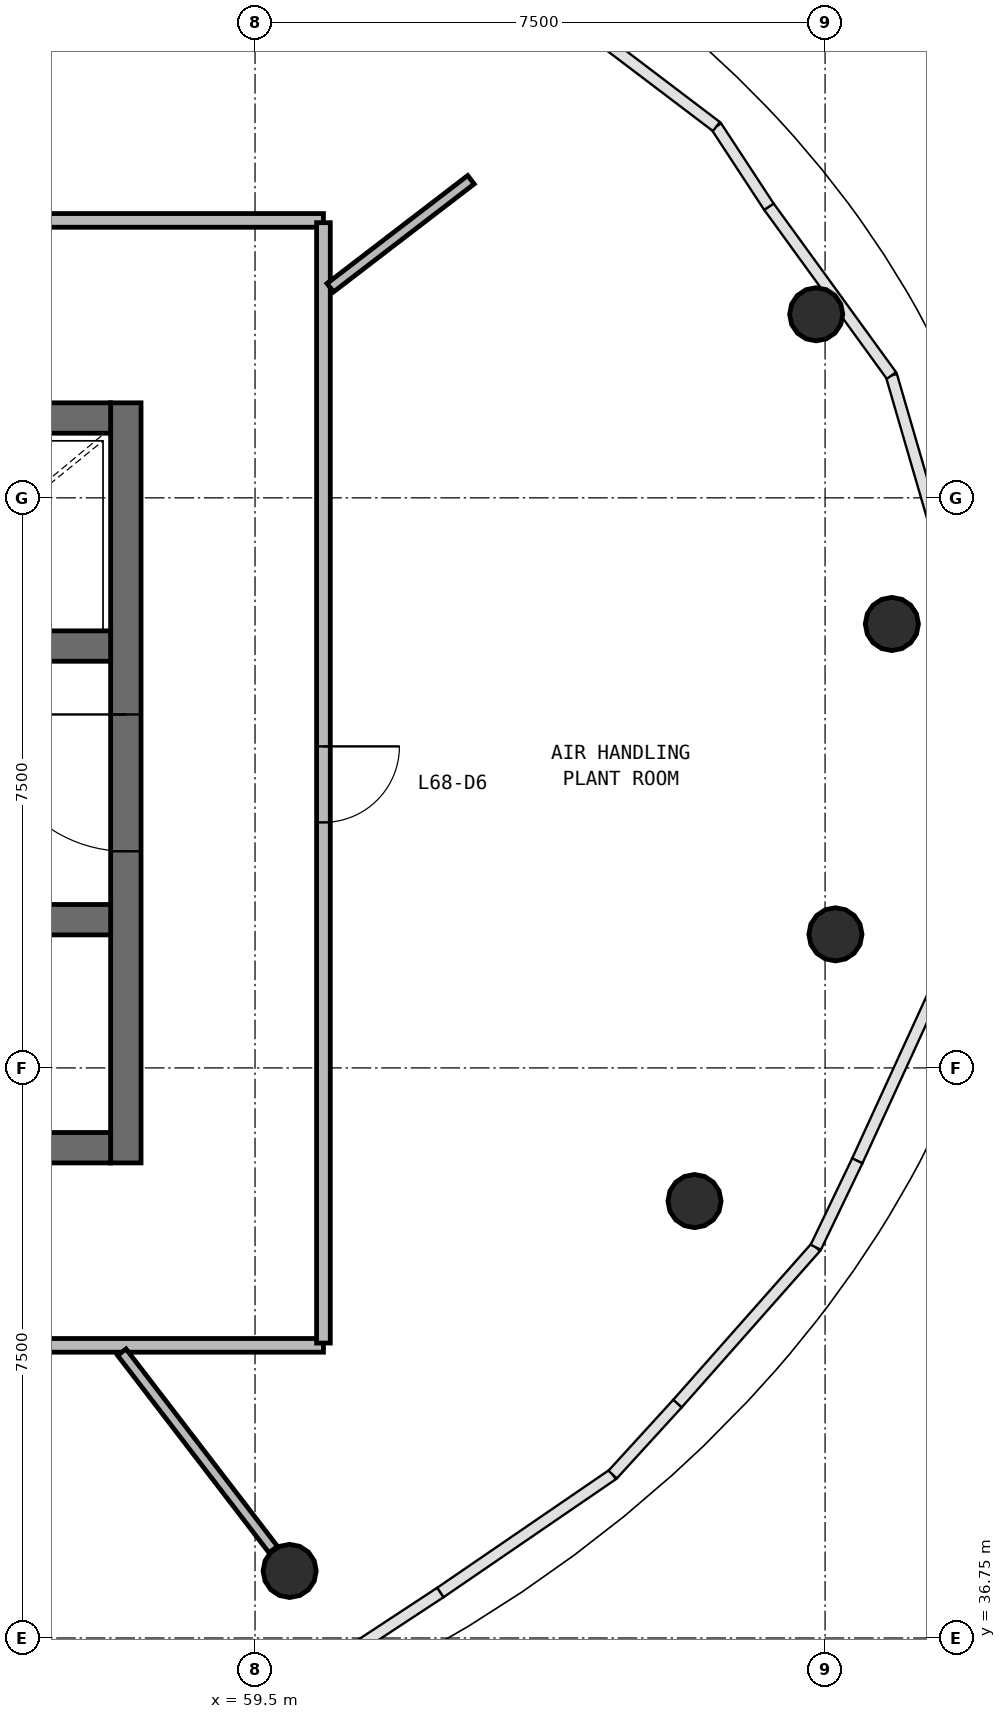
"""IFC4 building model, lengths in metres.
Left out: names, types, materials, properties, quantities, classifications, styles, units other than length and angle.
Written with IfcOpenShell. Run it as: python <this file> out.ifc"""

import sys

from ifc_helpers import new_model, si_unit, direction, frame, frame_2d, origin, origin_2d, place, context, subcontext, project, spatial, rectangle, circle, extrude, source, transform, mapped, element, fill, save


model = new_model("IFC4")
c1 = context("Model", 3, precision=1e-05, world=origin(), true_north=direction((0.0, 1.0)))
c2 = subcontext(c1, "Body", "Model", "MODEL_VIEW")
j1 = project(units=[si_unit("LENGTHUNIT", "METRE"), si_unit("PLANEANGLEUNIT", "RADIAN")], contexts=[c1])
p1 = place(None, origin())
s1 = spatial("IfcSite", under=j1, at=p1, CompositionType="ELEMENT")
p2 = place(p1, origin())
s2 = spatial("IfcBuilding", under=s1, at=p2, CompositionType="ELEMENT")
p3 = place(p2, frame((0.0, 0.0, 276.6)))
s3 = spatial("IfcBuildingStorey", under=s2, at=p3, CompositionType="ELEMENT", Elevation=276.6)
p4 = place(p3, frame((57.8, 43.0, 0.0), z_axis=(0.0, 0.0, 1.0), x_axis=(0.0, 1.0, 0.0)))
e1 = element("IfcWall", 1, at=p4, inside=s3, PredefinedType="SHEAR", context=c2, shape_type="SweptSolid", body=[
    extrude(rectangle(XDim=10.0, YDim=0.4, at=frame_2d((5.0, 0.0))), origin(), (0.0, 0.0, 1.0), 3.5),
])
p5 = place(p4, frame((4.1, 0.0, 0.0)))
e2 = element("IfcOpeningElement", 2, at=p5, cuts=e1, PredefinedType="OPENING", context=c2, shape_type="SweptSolid", body=[
    extrude(rectangle(XDim=1.8, YDim=2.1, at=frame_2d((0.9, 1.05))), frame((0.0, 0.21, 0.0), z_axis=(0.0, -1.0, 0.0), x_axis=(1.0, 0.0, 0.0)), (0.0, 0.0, 1.0), 0.42),
])
p6 = place(p3, frame((46.4, 43.2, 0.0), z_axis=(0.0, 0.0, 1.0), x_axis=(1.0, 0.0, 0.0)))
e3 = element("IfcWall", 3, at=p6, inside=s3, PredefinedType="SHEAR", context=c2, shape_type="SweptSolid", body=[
    extrude(rectangle(XDim=11.2, YDim=0.4, at=frame_2d((5.6, 0.0))), origin(), (0.0, 0.0, 1.0), 3.5),
])
p7 = place(p3, frame((57.6, 52.8, 0.0), z_axis=(0.0, 0.0, 1.0), x_axis=(-1.0, 0.0, 0.0)))
e4 = element("IfcWall", 4, at=p7, inside=s3, PredefinedType="SHEAR", context=c2, shape_type="SweptSolid", body=[
    extrude(rectangle(XDim=11.2, YDim=0.4, at=frame_2d((5.6, 0.0))), origin(), (0.0, 0.0, 1.0), 3.5),
])
p8 = place(p7, frame((6.1, 0.0, 0.0)))
e5 = element("IfcOpeningElement", 5, at=p8, cuts=e4, PredefinedType="OPENING", context=c2, shape_type="SweptSolid", body=[
    extrude(rectangle(XDim=1.0, YDim=2.1, at=frame_2d((0.5, 1.05))), frame((0.0, 0.21, 0.0), z_axis=(0.0, -1.0, 0.0), x_axis=(1.0, 0.0, 0.0)), (0.0, 0.0, 1.0), 0.42),
])
p9 = place(p3, frame((46.4, 49.8, 0.0), z_axis=(0.0, 0.0, 1.0), x_axis=(1.0, 0.0, 0.0)))
e6 = element("IfcWall", 6, at=p9, inside=s3, PredefinedType="SHEAR", context=c2, shape_type="SweptSolid", body=[
    extrude(rectangle(XDim=11.2, YDim=0.4, at=frame_2d((5.6, 0.0))), origin(), (0.0, 0.0, 1.0), 3.5),
])
p10 = place(p9, frame((8.95, 0.0, 0.0)))
e7 = element("IfcOpeningElement", 7, at=p10, cuts=e6, PredefinedType="OPENING", context=c2, shape_type="SweptSolid", body=[
    extrude(rectangle(XDim=1.1, YDim=2.1, at=frame_2d((0.55, 1.05))), frame((0.0, 0.21, 0.0), z_axis=(0.0, -1.0, 0.0), x_axis=(1.0, 0.0, 0.0)), (0.0, 0.0, 1.0), 0.42),
])
p11 = place(p9, frame((5.65, 0.0, 0.0)))
e8 = element("IfcOpeningElement", 8, at=p11, cuts=e6, PredefinedType="OPENING", context=c2, shape_type="SweptSolid", body=[
    extrude(rectangle(XDim=0.9, YDim=2.1, at=frame_2d((0.45, 1.05))), frame((0.0, 0.21, 0.0), z_axis=(0.0, -1.0, 0.0), x_axis=(1.0, 0.0, 0.0)), (0.0, 0.0, 1.0), 0.42),
])
p12 = place(p3, frame((46.4, 46.2, 0.0), z_axis=(0.0, 0.0, 1.0), x_axis=(1.0, 0.0, 0.0)))
e9 = element("IfcWall", 9, at=p12, inside=s3, PredefinedType="SHEAR", context=c2, shape_type="SweptSolid", body=[
    extrude(rectangle(XDim=11.2, YDim=0.4, at=frame_2d((5.6, 0.0))), origin(), (0.0, 0.0, 1.0), 3.5),
])
p13 = place(p12, frame((5.65, 0.0, 0.0)))
e10 = element("IfcOpeningElement", 10, at=p13, cuts=e9, PredefinedType="OPENING", context=c2, shape_type="SweptSolid", body=[
    extrude(rectangle(XDim=0.9, YDim=2.1, at=frame_2d((0.45, 1.05))), frame((0.0, 0.21, 0.0), z_axis=(0.0, -1.0, 0.0), x_axis=(1.0, 0.0, 0.0)), (0.0, 0.0, 1.0), 0.42),
])
m1 = source(origin(), c2, "Body", "SweptSolid", [
    extrude(circle(Radius=0.35, at=origin_2d()), origin(), (0.0, 0.0, 1.0), 4.014),
])
p14 = place(p3, frame((67.879, 50.091, 0.174), z_axis=(-0.48560488086, -0.063916184068, 0.871838643958), x_axis=(0.13049626669, -0.991448800685, 0.0)))
e11 = element("IfcColumn", 11, at=p14, inside=s3, PredefinedType="COLUMN", context=c2, shape_type="MappedRepresentation", body=[
    mapped(m1, transform((0.0, 0.0, 0.0), scale=1.0)),
])
m2 = source(origin(), c2, "Body", "SweptSolid", [
    extrude(circle(Radius=0.35, at=origin_2d()), origin(), (0.0, 0.0, 1.0), 4.07),
])
p15 = place(p3, frame((66.883, 54.165, 0.181), z_axis=(-0.471365631204, -0.195217483001, 0.86006079788), x_axis=(0.382635660379, -0.923899318869, 0.0)))
e12 = element("IfcColumn", 12, at=p15, inside=s3, PredefinedType="COLUMN", context=c2, shape_type="MappedRepresentation", body=[
    mapped(m2, transform((0.0, 0.0, 0.0), scale=1.0)),
])
m3 = source(origin(), c2, "Body", "SweptSolid", [
    extrude(circle(Radius=0.35, at=origin_2d()), origin(), (0.0, 0.0, 1.0), 3.747),
])
p16 = place(p3, frame((56.914, 36.137, 0.128), z_axis=(-0.136577604612, 0.329715018769, 0.934149112464), x_axis=(-0.923874408562, -0.38269580244, 0.0)))
e13 = element("IfcColumn", 13, at=p16, inside=s3, PredefinedType="COLUMN", context=c2, shape_type="MappedRepresentation", body=[
    mapped(m3, transform((0.0, 0.0, 0.0), scale=1.0)),
])
m4 = source(origin(), c2, "Body", "SweptSolid", [
    extrude(circle(Radius=0.35, at=origin_2d()), origin(), (0.0, 0.0, 1.0), 3.739),
])
p17 = place(p3, frame((59.956, 37.632, 0.126), z_axis=(-0.21405361087, 0.278961874812, 0.936141722217), x_axis=(-0.793355214176, -0.608758986907, 0.0)))
e14 = element("IfcColumn", 14, at=p17, inside=s3, PredefinedType="COLUMN", context=c2, shape_type="MappedRepresentation", body=[
    mapped(m4, transform((0.0, 0.0, 0.0), scale=1.0)),
])
m5 = source(origin(), c2, "Body", "SweptSolid", [
    extrude(circle(Radius=0.35, at=origin_2d()), origin(), (0.0, 0.0, 1.0), 3.807),
])
p18 = place(p3, frame((65.282, 42.498, 0.141), z_axis=(-0.363645996148, 0.150626775693, 0.919278610613), x_axis=(-0.382682721486, -0.923879826967, 0.0)))
e15 = element("IfcColumn", 15, at=p18, inside=s3, PredefinedType="COLUMN", context=c2, shape_type="MappedRepresentation", body=[
    mapped(m5, transform((0.0, 0.0, 0.0), scale=1.0)),
])
m6 = source(origin(), c2, "Body", "SweptSolid", [
    extrude(circle(Radius=0.35, at=origin_2d()), origin(), (0.0, 0.0, 1.0), 3.898),
])
p19 = place(p3, frame((67.136, 46.007, 0.157), z_axis=(-0.436578084577, 0.057429651923, 0.897831504876), x_axis=(-0.130421400619, -0.991458651816, 0.0)))
e16 = element("IfcColumn", 16, at=p19, inside=s3, PredefinedType="COLUMN", context=c2, shape_type="MappedRepresentation", body=[
    mapped(m6, transform((0.0, 0.0, 0.0), scale=1.0)),
])
p20 = place(p3, frame((43.6, 55.4, 0.0), z_axis=(0.0, 0.0, 1.0), x_axis=(1.0, 0.0, 0.0)))
e17 = element("IfcWall", 17, at=p20, inside=s3, PredefinedType="PARTITIONING", context=c2, shape_type="SweptSolid", body=[
    extrude(rectangle(XDim=16.8, YDim=0.18, at=frame_2d((8.4, 0.0))), origin(), (0.0, 0.0, 1.0), 2.62),
])
p21 = place(p20, frame((7.95, 0.0, 0.0)))
e18 = element("IfcOpeningElement", 18, at=p21, cuts=e17, PredefinedType="OPENING", context=c2, shape_type="SweptSolid", body=[
    extrude(rectangle(XDim=1.0, YDim=2.1, at=frame_2d((0.5, 1.05))), frame((0.0, 0.1, 0.0), z_axis=(0.0, -1.0, 0.0), x_axis=(1.0, 0.0, 0.0)), (0.0, 0.0, 1.0), 0.2),
])
p22 = place(p3, frame((60.4, 40.6, 0.0), z_axis=(0.0, 0.0, 1.0), x_axis=(-1.0, 0.0, 0.0)))
e19 = element("IfcWall", 19, at=p22, inside=s3, PredefinedType="PARTITIONING", context=c2, shape_type="SweptSolid", body=[
    extrude(rectangle(XDim=16.8, YDim=0.18, at=frame_2d((8.4, 0.0))), origin(), (0.0, 0.0, 1.0), 2.62),
])
p23 = place(p22, frame((7.95, 0.0, 0.0)))
e20 = element("IfcOpeningElement", 20, at=p23, cuts=e19, PredefinedType="OPENING", context=c2, shape_type="SweptSolid", body=[
    extrude(rectangle(XDim=1.0, YDim=2.1, at=frame_2d((0.5, 1.05))), frame((0.0, 0.1, 0.0), z_axis=(0.0, -1.0, 0.0), x_axis=(1.0, 0.0, 0.0)), (0.0, 0.0, 1.0), 0.2),
])
p24 = place(p3, frame((60.4, 55.37, 0.0), z_axis=(0.0, 0.0, 1.0), x_axis=(0.0, -1.0, 0.0)))
e21 = element("IfcWall", 21, at=p24, inside=s3, PredefinedType="PARTITIONING", context=c2, shape_type="SweptSolid", body=[
    extrude(rectangle(XDim=14.74, YDim=0.18, at=frame_2d((7.37, 0.0))), origin(), (0.0, 0.0, 1.0), 2.62),
])
p25 = place(p24, frame((6.89, 0.0, 0.0)))
e22 = element("IfcOpeningElement", 22, at=p25, cuts=e21, PredefinedType="OPENING", context=c2, shape_type="SweptSolid", body=[
    extrude(rectangle(XDim=1.0, YDim=2.1, at=frame_2d((0.5, 1.05))), frame((0.0, 0.1, 0.0), z_axis=(0.0, -1.0, 0.0), x_axis=(1.0, 0.0, 0.0)), (0.0, 0.0, 1.0), 0.2),
])
p26 = place(p3, frame((60.49, 54.515, 0.0), z_axis=(0.0, 0.0, 1.0), x_axis=(0.793370454613, 0.608739124542, 0.0)))
e23 = element("IfcWall", 23, at=p26, inside=s3, PredefinedType="PARTITIONING", context=c2, shape_type="SweptSolid", body=[
    extrude(rectangle(XDim=2.333, YDim=0.14, at=frame_2d((1.166, 0.0))), origin(), (0.0, 0.0, 1.0), 2.62),
])
p27 = place(p3, frame((57.747, 40.51, 0.0), z_axis=(0.0, 0.0, 1.0), x_axis=(0.608736894437, -0.793372165728, 0.0)))
e24 = element("IfcWall", 24, at=p27, inside=s3, PredefinedType="PARTITIONING", context=c2, shape_type="SweptSolid", body=[
    extrude(rectangle(XDim=3.273, YDim=0.14, at=frame_2d((1.636, 0.0))), origin(), (0.0, 0.0, 1.0), 2.62),
])
m7 = source(origin(), c2, "Body", "SweptSolid", [
    extrude(rectangle(XDim=1.8, YDim=2.1, at=frame_2d((0.9, 1.05))), frame((0.0, 0.025, 0.0), z_axis=(0.0, -1.0, 0.0), x_axis=(1.0, 0.0, 0.0)), (0.0, 0.0, 1.0), 0.05),
])
p28 = place(p5, origin())
e25 = element("IfcDoor", 25, at=p28, inside=s3, OperationType="SINGLE_SWING_RIGHT", PredefinedType="DOOR", context=c2, shape_type="MappedRepresentation", body=[
    mapped(m7, transform((0.0, 0.0, 0.0), scale=1.0)),
])
fill(e2, e25)
m8 = source(origin(), c2, "Body", "SweptSolid", [
    extrude(rectangle(XDim=1.0, YDim=2.1, at=frame_2d((0.5, 1.05))), frame((0.0, 0.025, 0.0), z_axis=(0.0, -1.0, 0.0), x_axis=(1.0, 0.0, 0.0)), (0.0, 0.0, 1.0), 0.05),
])
p29 = place(p25, origin())
e26 = element("IfcDoor", 26, at=p29, inside=s3, OperationType="SINGLE_SWING_LEFT", PredefinedType="DOOR", context=c2, shape_type="MappedRepresentation", body=[
    mapped(m8, transform((0.0, 0.0, 0.0), scale=1.0)),
])
fill(e22, e26)
save(model, sys.argv[1])
